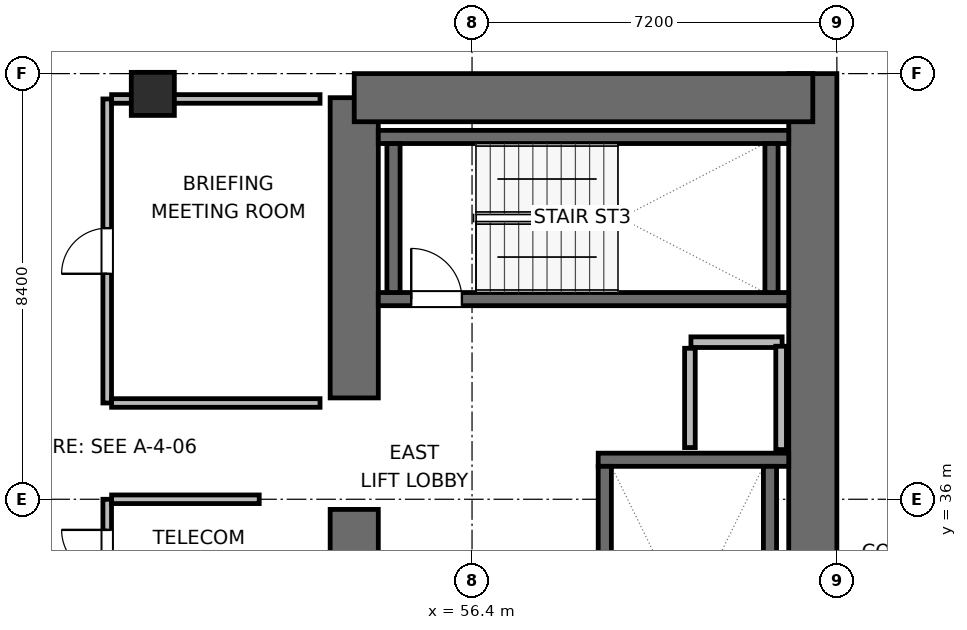
"""IFC4 building model, lengths in metres.
Left out: names, types, materials, properties, quantities, classifications, styles, units other than length and angle.
Written with IfcOpenShell. Run it as: python <this file> out.ifc"""

import sys

from ifc_helpers import new_model, si_unit, direction, frame, frame_2d, origin, origin_2d, place, context, subcontext, project, spatial, rectangle, extrude, element, fill, save


model = new_model("IFC4")
c1 = context("Model", 3, precision=1e-05, world=origin(), true_north=direction((0.0, 1.0)))
c2 = subcontext(c1, "Body", "Model", "MODEL_VIEW")
j1 = project(units=[si_unit("LENGTHUNIT", "METRE"), si_unit("PLANEANGLEUNIT", "RADIAN")], contexts=[c1])
p1 = place(None, origin())
s1 = spatial("IfcSite", under=j1, at=p1, CompositionType="ELEMENT")
p2 = place(p1, origin())
s2 = spatial("IfcBuilding", under=s1, at=p2, CompositionType="ELEMENT")
p3 = place(p2, frame((0.0, 0.0, 85.8)))
s3 = spatial("IfcBuildingStorey", under=s2, at=p3, CompositionType="ELEMENT", Elevation=85.8)
p4 = place(p3, frame((54.075, 28.075, 0.0), z_axis=(0.0, 0.0, 1.0), x_axis=(0.0, 1.0, 0.0)))
e1 = element("IfcWall", 1, at=p4, inside=s3, PredefinedType="SHEAR", context=c2, shape_type="SweptSolid", body=[
    extrude(rectangle(XDim=7.725, YDim=0.95, at=frame_2d((3.863, 0.0))), origin(), (0.0, 0.0, 1.0), 3.9),
])
p5 = place(p3, frame((54.075, 38.0, 0.0), z_axis=(0.0, 0.0, 1.0), x_axis=(0.0, 1.0, 0.0)))
e2 = element("IfcWall", 2, at=p5, inside=s3, PredefinedType="SHEAR", context=c2, shape_type="SweptSolid", body=[
    extrude(rectangle(XDim=5.925, YDim=0.95, at=frame_2d((2.962, 0.0))), origin(), (0.0, 0.0, 1.0), 3.9),
])
p6 = place(p3, frame((63.125, 27.6, 0.0), z_axis=(0.0, 0.0, 1.0), x_axis=(0.0, 1.0, 0.0)))
e3 = element("IfcWall", 3, at=p6, inside=s3, PredefinedType="SHEAR", context=c2, shape_type="SweptSolid", body=[
    extrude(rectangle(XDim=16.8, YDim=0.95, at=frame_2d((8.4, 0.0))), origin(), (0.0, 0.0, 1.0), 3.9),
])
p7 = place(p3, frame((54.075, 43.925, 0.0), z_axis=(0.0, 0.0, 1.0), x_axis=(1.0, 0.0, 0.0)))
e4 = element("IfcWall", 4, at=p7, inside=s3, PredefinedType="SHEAR", context=c2, shape_type="SweptSolid", body=[
    extrude(rectangle(XDim=9.05, YDim=0.95, at=frame_2d((4.525, 0.0))), origin(), (0.0, 0.0, 1.0), 3.9),
])
p8 = place(p3, frame((58.89, 36.78, 0.0), z_axis=(0.0, 0.0, 1.0), x_axis=(1.0, 0.0, 0.0)))
e5 = element("IfcWall", 5, at=p8, inside=s3, PredefinedType="SHEAR", context=c2, shape_type="SweptSolid", body=[
    extrude(rectangle(XDim=3.76, YDim=0.26, at=frame_2d((1.88, 0.0))), origin(), (0.0, 0.0, 1.0), 3.9),
])
p9 = place(p3, frame((59.02, 29.05, 0.0), z_axis=(0.0, 0.0, 1.0), x_axis=(0.0, 1.0, 0.0)))
e6 = element("IfcWall", 6, at=p9, inside=s3, PredefinedType="SHEAR", context=c2, shape_type="SweptSolid", body=[
    extrude(rectangle(XDim=7.6, YDim=0.26, at=frame_2d((3.8, 0.0))), origin(), (0.0, 0.0, 1.0), 3.9),
])
p10 = place(p9, frame((0.3, 0.0, 0.0)))
e7 = element("IfcOpeningElement", 7, at=p10, cuts=e6, PredefinedType="OPENING", context=c2, shape_type="SweptSolid", body=[
    extrude(rectangle(XDim=1.0, YDim=2.04, at=frame_2d((0.5, 1.02))), frame((0.0, 0.14, 0.0), z_axis=(0.0, -1.0, 0.0), x_axis=(1.0, 0.0, 0.0)), (0.0, 0.0, 1.0), 0.28),
])
p11 = place(p3, frame((62.28, 29.05, 0.0), z_axis=(0.0, 0.0, 1.0), x_axis=(0.0, 1.0, 0.0)))
e8 = element("IfcWall", 8, at=p11, inside=s3, PredefinedType="SHEAR", context=c2, shape_type="SweptSolid", body=[
    extrude(rectangle(XDim=7.6, YDim=0.26, at=frame_2d((3.8, 0.0))), origin(), (0.0, 0.0, 1.0), 3.9),
])
p12 = place(p3, frame((54.55, 39.95, 0.0), z_axis=(0.0, 0.0, 1.0), x_axis=(1.0, 0.0, 0.0)))
e9 = element("IfcWall", 9, at=p12, inside=s3, PredefinedType="SHEAR", context=c2, shape_type="SweptSolid", body=[
    extrude(rectangle(XDim=8.1, YDim=0.26, at=frame_2d((4.05, 0.0))), origin(), (0.0, 0.0, 1.0), 3.9),
])
p13 = place(p12, frame((0.65, 0.0, 0.0)))
e10 = element("IfcOpeningElement", 10, at=p13, cuts=e9, PredefinedType="OPENING", context=c2, shape_type="SweptSolid", body=[
    extrude(rectangle(XDim=1.0, YDim=2.04, at=frame_2d((0.5, 1.02))), frame((0.0, 0.14, 0.0), z_axis=(0.0, -1.0, 0.0), x_axis=(1.0, 0.0, 0.0)), (0.0, 0.0, 1.0), 0.28),
])
p14 = place(p3, frame((54.55, 43.15, 0.0), z_axis=(0.0, 0.0, 1.0), x_axis=(1.0, 0.0, 0.0)))
e11 = element("IfcWall", 11, at=p14, inside=s3, PredefinedType="SHEAR", context=c2, shape_type="SweptSolid", body=[
    extrude(rectangle(XDim=8.1, YDim=0.26, at=frame_2d((4.05, 0.0))), origin(), (0.0, 0.0, 1.0), 3.9),
])
for number, where, z_axis, x_axis in (
    (12, (54.85, 40.08, 0.0), (0.0, 0.0, 1.0), (0.0, 1.0, 0.0)),
    (13, (62.31, 40.08, 0.0), (0.0, 0.0, 1.0), (0.0, 1.0, 0.0)),
):
    element("IfcWall", number, at=place(p3, frame(where, z_axis=z_axis, x_axis=x_axis)), inside=s3, PredefinedType="SHEAR", context=c2, shape_type="SweptSolid", body=[
        extrude(rectangle(XDim=2.94, YDim=0.26, at=frame_2d((1.47, 0.0))), origin(), (0.0, 0.0, 1.0), 3.9),
    ])
p15 = place(p3, frame((50.1, 44.0, 0.0), z_axis=(0.0, 0.0, 1.0), x_axis=(1.0, 0.0, 0.0)))
e14 = element("IfcColumn", 14, at=p15, inside=s3, PredefinedType="COLUMN", context=c2, shape_type="SweptSolid", body=[
    extrude(rectangle(XDim=0.85, YDim=0.85, at=origin_2d()), origin(), (0.0, 0.0, 1.0), 3.9),
])
p16 = place(p3, frame((60.72, 39.1, 0.0), z_axis=(0.0, 0.0, 1.0), x_axis=(1.0, 0.0, 0.0)))
e15 = element("IfcWall", 15, at=p16, inside=s3, PredefinedType="PARTITIONING", context=c2, shape_type="SweptSolid", body=[
    extrude(rectangle(XDim=1.8, YDim=0.21, at=frame_2d((0.9, 0.0))), origin(), (0.0, 0.0, 1.0), 3.64),
])
p17 = place(p3, frame((60.7, 37.02, 0.0), z_axis=(0.0, 0.0, 1.0), x_axis=(0.0, 1.0, 0.0)))
e16 = element("IfcWall", 16, at=p17, inside=s3, PredefinedType="PARTITIONING", context=c2, shape_type="SweptSolid", body=[
    extrude(rectangle(XDim=1.96, YDim=0.21, at=frame_2d((0.98, 0.0))), origin(), (0.0, 0.0, 1.0), 3.64),
])
p18 = place(p3, frame((62.5, 36.98, 0.0), z_axis=(0.0, 0.0, 1.0), x_axis=(0.0, 1.0, 0.0)))
e17 = element("IfcWall", 17, at=p18, inside=s3, PredefinedType="PARTITIONING", context=c2, shape_type="SweptSolid", body=[
    extrude(rectangle(XDim=2.04, YDim=0.21, at=frame_2d((1.02, 0.0))), origin(), (0.0, 0.0, 1.0), 3.64),
])
p19 = place(p3, frame((49.2, 32.6, 0.0), z_axis=(0.0, 0.0, 1.0), x_axis=(0.0, 1.0, 0.0)))
e18 = element("IfcWall", 18, at=p19, inside=s3, PredefinedType="PARTITIONING", context=c2, shape_type="SweptSolid", body=[
    extrude(rectangle(XDim=3.4, YDim=0.17, at=frame_2d((1.7, 0.0))), origin(), (0.0, 0.0, 1.0), 3.64),
])
p20 = place(p19, frame((0.196, 0.0, 0.0)))
e19 = element("IfcOpeningElement", 19, at=p20, cuts=e18, PredefinedType="OPENING", context=c2, shape_type="SweptSolid", body=[
    extrude(rectangle(XDim=0.9, YDim=2.02, at=frame_2d((0.45, 1.01))), frame((0.0, 0.095, 0.0), z_axis=(0.0, -1.0, 0.0), x_axis=(1.0, 0.0, 0.0)), (0.0, 0.0, 1.0), 0.19),
])
p21 = place(p19, frame((1.896, 0.0, 0.0)))
e20 = element("IfcOpeningElement", 20, at=p21, cuts=e18, PredefinedType="OPENING", context=c2, shape_type="SweptSolid", body=[
    extrude(rectangle(XDim=0.9, YDim=2.02, at=frame_2d((0.45, 1.01))), frame((0.0, 0.095, 0.0), z_axis=(0.0, -1.0, 0.0), x_axis=(1.0, 0.0, 0.0)), (0.0, 0.0, 1.0), 0.19),
])
p22 = place(p3, frame((49.287, 36.0, 0.0), z_axis=(0.0, 0.0, 1.0), x_axis=(1.0, 0.0, 0.0)))
e21 = element("IfcWall", 21, at=p22, inside=s3, PredefinedType="PARTITIONING", context=c2, shape_type="SweptSolid", body=[
    extrude(rectangle(XDim=2.913, YDim=0.17, at=frame_2d((1.457, 0.0))), origin(), (0.0, 0.0, 1.0), 3.64),
])
p23 = place(p3, frame((49.2, 37.9, 0.0), z_axis=(0.0, 0.0, 1.0), x_axis=(0.0, 1.0, 0.0)))
e22 = element("IfcWall", 22, at=p23, inside=s3, PredefinedType="PARTITIONING", context=c2, shape_type="SweptSolid", body=[
    extrude(rectangle(XDim=6.0, YDim=0.17, at=frame_2d((3.0, 0.0))), origin(), (0.0, 0.0, 1.0), 3.64),
])
p24 = place(p23, frame((2.55, 0.0, 0.0)))
e23 = element("IfcOpeningElement", 23, at=p24, cuts=e22, PredefinedType="OPENING", context=c2, shape_type="SweptSolid", body=[
    extrude(rectangle(XDim=0.9, YDim=2.02, at=frame_2d((0.45, 1.01))), frame((0.0, 0.095, 0.0), z_axis=(0.0, -1.0, 0.0), x_axis=(1.0, 0.0, 0.0)), (0.0, 0.0, 1.0), 0.19),
])
p25 = place(p3, frame((49.287, 37.9, 0.0), z_axis=(0.0, 0.0, 1.0), x_axis=(1.0, 0.0, 0.0)))
e24 = element("IfcWall", 24, at=p25, inside=s3, PredefinedType="PARTITIONING", context=c2, shape_type="SweptSolid", body=[
    extrude(rectangle(XDim=4.113, YDim=0.17, at=frame_2d((2.056, 0.0))), origin(), (0.0, 0.0, 1.0), 3.64),
])
p26 = place(p3, frame((49.287, 43.9, 0.0), z_axis=(0.0, 0.0, 1.0), x_axis=(1.0, 0.0, 0.0)))
e25 = element("IfcWall", 25, at=p26, inside=s3, PredefinedType="PARTITIONING", context=c2, shape_type="SweptSolid", body=[
    extrude(rectangle(XDim=4.113, YDim=0.17, at=frame_2d((2.056, 0.0))), origin(), (0.0, 0.0, 1.0), 2.525),
])
p27 = place(p13, origin())
e26 = element("IfcDoor", 26, at=p27, inside=s3, OperationType="SINGLE_SWING_LEFT", PredefinedType="DOOR", context=c2, shape_type="SweptSolid", body=[
    extrude(rectangle(XDim=1.0, YDim=2.04, at=frame_2d((0.5, 1.02))), frame((0.0, 0.025, 0.0), z_axis=(0.0, -1.0, 0.0), x_axis=(1.0, 0.0, 0.0)), (0.0, 0.0, 1.0), 0.05),
])
fill(e10, e26)
p28 = place(p21, origin())
e27 = element("IfcDoor", 27, at=p28, inside=s3, OperationType="SINGLE_SWING_RIGHT", PredefinedType="DOOR", context=c2, shape_type="SweptSolid", body=[
    extrude(rectangle(XDim=0.9, YDim=2.02, at=frame_2d((0.45, 1.01))), frame((0.0, 0.025, 0.0), z_axis=(0.0, -1.0, 0.0), x_axis=(1.0, 0.0, 0.0)), (0.0, 0.0, 1.0), 0.05),
])
fill(e20, e27)
p29 = place(p24, origin())
e28 = element("IfcDoor", 28, at=p29, inside=s3, OperationType="SINGLE_SWING_LEFT", PredefinedType="DOOR", context=c2, shape_type="SweptSolid", body=[
    extrude(rectangle(XDim=0.9, YDim=2.02, at=frame_2d((0.45, 1.01))), frame((0.0, 0.025, 0.0), z_axis=(0.0, -1.0, 0.0), x_axis=(1.0, 0.0, 0.0)), (0.0, 0.0, 1.0), 0.05),
])
fill(e23, e28)
save(model, sys.argv[1])
